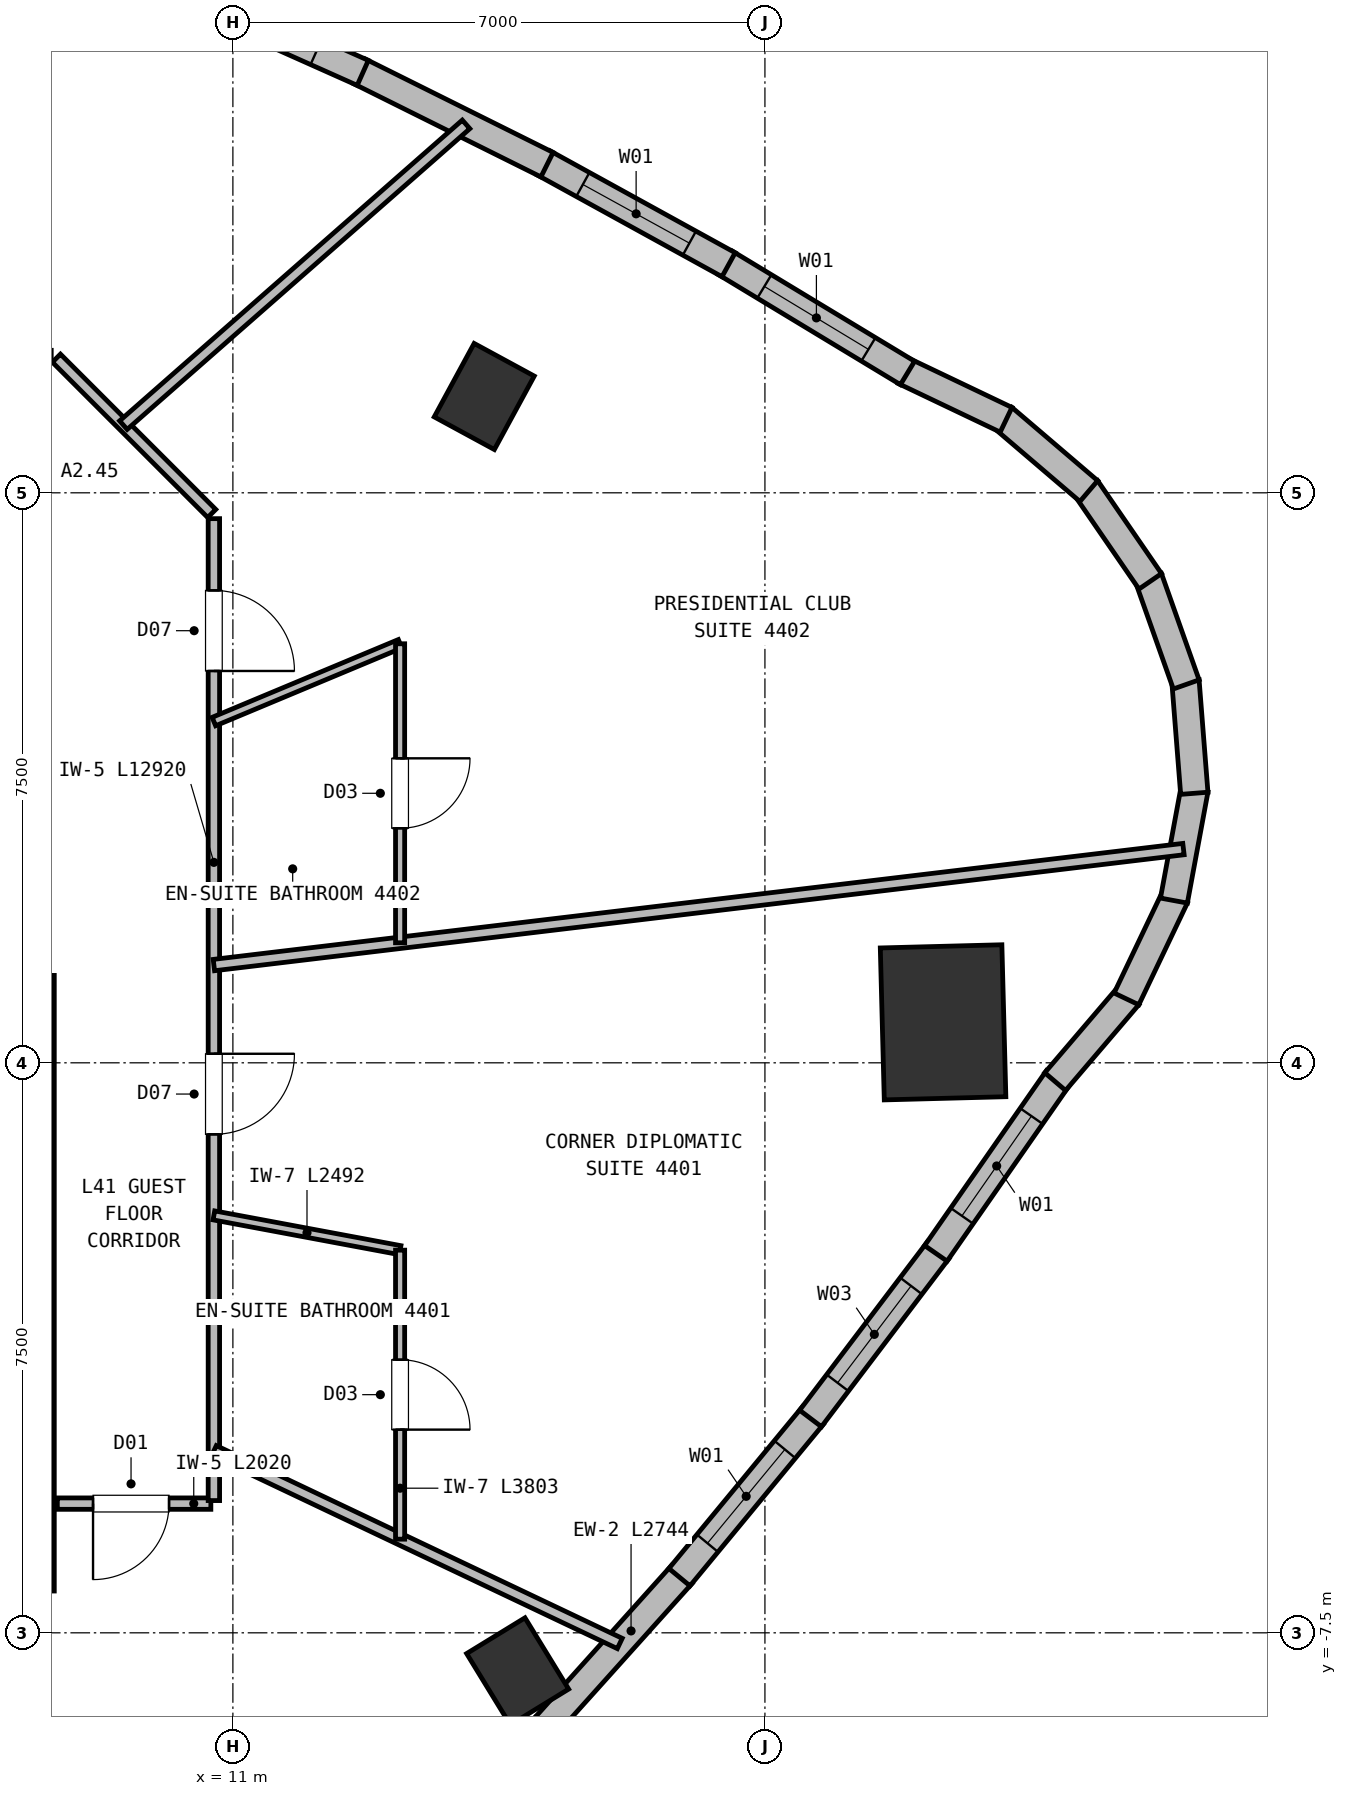
"""IFC4 building model, lengths in metres.
Left out: names, types, materials, properties, quantities, classifications, styles, units other than length and angle.
Written with IfcOpenShell. Run it as: python <this file> out.ifc"""

import sys

from ifc_helpers import new_model, si_unit, direction, frame, frame_2d, origin, origin_2d, place, context, subcontext, project, spatial, rectangle, extrude, element, fill, save


model = new_model("IFC4")
c1 = context("Model", 3, precision=1e-05, world=origin(), true_north=direction((0.0, 1.0)))
c2 = subcontext(c1, "Body", "Model", "MODEL_VIEW")
j1 = project(units=[si_unit("LENGTHUNIT", "METRE"), si_unit("PLANEANGLEUNIT", "RADIAN")], contexts=[c1])
p1 = place(None, origin())
s1 = spatial("IfcSite", under=j1, at=p1, CompositionType="ELEMENT")
p2 = place(p1, origin())
s2 = spatial("IfcBuilding", under=s1, at=p2, CompositionType="ELEMENT")
p3 = place(p2, frame((0.0, 0.0, 164.75)))
s3 = spatial("IfcBuildingStorey", under=s2, at=p3, CompositionType="ELEMENT", Elevation=164.75)
p4 = place(p3, frame((8.35, -6.95, 0.0), z_axis=(0.0, 0.0, 1.0), x_axis=(0.0, 1.0, 0.0)))
e1 = element("IfcWall", 1, at=p4, inside=s3, PredefinedType="SHEAR", context=c2, shape_type="SweptSolid", body=[
    extrude(rectangle(XDim=8.1, YDim=0.6, at=frame_2d((4.05, 0.0))), origin(), (0.0, 0.0, 1.0), 3.44),
])
p5 = place(p3, frame((14.747, -8.007, 0.0), z_axis=(0.0, 0.0, 1.0), x_axis=(0.852640164354, 0.522498564716, 0.0)))
e2 = element("IfcColumn", 2, at=p5, inside=s3, PredefinedType="COLUMN", context=c2, shape_type="SweptSolid", body=[
    extrude(rectangle(XDim=0.9, YDim=1.1, at=origin_2d()), origin(), (0.0, 0.0, 1.0), 3.75),
])
p6 = place(p3, frame((20.344, 0.533, 0.0), z_axis=(0.0, 0.0, 1.0), x_axis=(0.999657324976, 0.026176948308, 0.0)))
e3 = element("IfcColumn", 3, at=p6, inside=s3, PredefinedType="COLUMN", context=c2, shape_type="SweptSolid", body=[
    extrude(rectangle(XDim=1.6, YDim=2.0, at=origin_2d()), origin(), (0.0, 0.0, 1.0), 3.75),
])
p7 = place(p3, frame((14.307, 8.767, 0.0), z_axis=(0.0, 0.0, 1.0), x_axis=(-0.878817112662, 0.47715876026, 0.0)))
e4 = element("IfcColumn", 4, at=p7, inside=s3, PredefinedType="COLUMN", context=c2, shape_type="SweptSolid", body=[
    extrude(rectangle(XDim=0.9, YDim=1.1, at=origin_2d()), origin(), (0.0, 0.0, 1.0), 3.75),
])
p8 = place(p3, frame((16.908, -6.73, 0.0), z_axis=(0.0, 0.0, 1.0), x_axis=(-0.668236939939, -0.743948514415, 0.0)))
e5 = element("IfcWall", 5, at=p8, inside=s3, PredefinedType="SOLIDWALL", context=c2, shape_type="SweptSolid", body=[
    extrude(rectangle(XDim=2.744, YDim=0.36, at=frame_2d((1.372, 0.0))), origin(), (0.0, 0.0, 1.0), 3.44),
])
p9 = place(p3, frame((18.631, -4.641, 0.0), z_axis=(0.0, 0.0, 1.0), x_axis=(-0.636538297182, -0.771245094779, 0.0)))
e6 = element("IfcWall", 6, at=p9, inside=s3, PredefinedType="SOLIDWALL", context=c2, shape_type="SweptSolid", body=[
    extrude(rectangle(XDim=2.759, YDim=0.36, at=frame_2d((1.379, 0.0))), origin(), (0.0, 0.0, 1.0), 3.44),
])
p10 = place(p9, frame((0.579, 0.0, 0.72)))
e7 = element("IfcOpeningElement", 7, at=p10, cuts=e6, PredefinedType="OPENING", context=c2, shape_type="SweptSolid", body=[
    extrude(rectangle(XDim=1.6, YDim=1.88, at=frame_2d((0.8, 0.94))), frame((0.0, 0.19, 0.0), z_axis=(0.0, -1.0, 0.0), x_axis=(1.0, 0.0, 0.0)), (0.0, 0.0, 1.0), 0.38),
])
p11 = place(p3, frame((20.278, -2.467, 0.0), z_axis=(0.0, 0.0, 1.0), x_axis=(-0.604224865549, -0.796813850189, 0.0)))
e8 = element("IfcWall", 8, at=p11, inside=s3, PredefinedType="SOLIDWALL", context=c2, shape_type="SweptSolid", body=[
    extrude(rectangle(XDim=2.778, YDim=0.36, at=frame_2d((1.389, 0.0))), origin(), (0.0, 0.0, 1.0), 3.44),
])
p12 = place(p11, frame((0.589, 0.0, 0.72)))
e9 = element("IfcOpeningElement", 9, at=p12, cuts=e8, PredefinedType="OPENING", context=c2, shape_type="SweptSolid", body=[
    extrude(rectangle(XDim=1.6, YDim=1.88, at=frame_2d((0.8, 0.94))), frame((0.0, 0.19, 0.0), z_axis=(0.0, -1.0, 0.0), x_axis=(1.0, 0.0, 0.0)), (0.0, 0.0, 1.0), 0.38),
])
p13 = place(p3, frame((21.849, -0.208, 0.0), z_axis=(0.0, 0.0, 1.0), x_axis=(-0.571360652728, -0.820699094988, 0.0)))
e10 = element("IfcWall", 10, at=p13, inside=s3, PredefinedType="SOLIDWALL", context=c2, shape_type="SweptSolid", body=[
    extrude(rectangle(XDim=2.801, YDim=0.36, at=frame_2d((1.401, 0.0))), origin(), (0.0, 0.0, 1.0), 3.44),
])
p14 = place(p13, frame((0.601, 0.0, 0.72)))
e11 = element("IfcOpeningElement", 11, at=p14, cuts=e10, PredefinedType="OPENING", context=c2, shape_type="SweptSolid", body=[
    extrude(rectangle(XDim=1.6, YDim=1.88, at=frame_2d((0.8, 0.94))), frame((0.0, 0.19, 0.0), z_axis=(0.0, -1.0, 0.0), x_axis=(1.0, 0.0, 0.0)), (0.0, 0.0, 1.0), 0.38),
])
p15 = place(p3, frame((22.784, 0.882, 0.0), z_axis=(0.0, 0.0, 1.0), x_axis=(-0.649464075578, -0.760392276745, 0.0)))
e12 = element("IfcWall", 12, at=p15, inside=s3, PredefinedType="SOLIDWALL", context=c2, shape_type="SweptSolid", body=[
    extrude(rectangle(XDim=1.486, YDim=0.36, at=frame_2d((0.743, 0.0))), origin(), (0.0, 0.0, 1.0), 3.44),
])
for number, where, z_axis, x_axis in (
    (13, (23.396, 2.182, 0.0), (0.0, 0.0, 1.0), (-0.431, -0.903, 0.0)),
    (14, (23.652, 3.596, 0.0), (0.0, 0.0, 1.0), (-0.182, -0.983, 0.0)),
    (15, (23.533, 5.027, 0.0), (0.0, 0.0, 1.0), (0.078, -0.997, 0.0)),
    (16, (23.047, 6.379, 0.0), (0.0, 0.0, 1.0), (0.334, -0.943, 0.0)),
):
    element("IfcWall", number, at=place(p3, frame(where, z_axis=z_axis, x_axis=x_axis)), inside=s3, PredefinedType="SOLIDWALL", context=c2, shape_type="SweptSolid", body=[
        extrude(rectangle(XDim=1.486, YDim=0.36, at=frame_2d((0.743, 0.0))), origin(), (0.0, 0.0, 1.0), 3.44),
    ])
p16 = place(p3, frame((22.228, 7.56, 0.0), z_axis=(0.0, 0.0, 1.0), x_axis=(0.56647304132, -0.824080271247, 0.0)))
e17 = element("IfcWall", 17, at=p16, inside=s3, PredefinedType="SOLIDWALL", context=c2, shape_type="SweptSolid", body=[
    extrude(rectangle(XDim=1.486, YDim=0.36, at=frame_2d((0.743, 0.0))), origin(), (0.0, 0.0, 1.0), 3.44),
])
p17 = place(p3, frame((21.131, 8.488, 0.0), z_axis=(0.0, 0.0, 1.0), x_axis=(0.760392276745, -0.649464075578, 0.0)))
e18 = element("IfcWall", 18, at=p17, inside=s3, PredefinedType="SOLIDWALL", context=c2, shape_type="SweptSolid", body=[
    extrude(rectangle(XDim=1.486, YDim=0.36, at=frame_2d((0.743, 0.0))), origin(), (0.0, 0.0, 1.0), 3.44),
])
p18 = place(p3, frame((19.832, 9.101, 0.0), z_axis=(0.0, 0.0, 1.0), x_axis=(0.902523129088, -0.430641383823, 0.0)))
e19 = element("IfcWall", 19, at=p18, inside=s3, PredefinedType="SOLIDWALL", context=c2, shape_type="SweptSolid", body=[
    extrude(rectangle(XDim=1.486, YDim=0.36, at=frame_2d((0.743, 0.0))), origin(), (0.0, 0.0, 1.0), 3.44),
])
p19 = place(p3, frame((17.479, 10.526, 0.0), z_axis=(0.0, 0.0, 1.0), x_axis=(0.855749933122, -0.517389651967, 0.0)))
e20 = element("IfcWall", 20, at=p19, inside=s3, PredefinedType="SOLIDWALL", context=c2, shape_type="SweptSolid", body=[
    extrude(rectangle(XDim=2.801, YDim=0.36, at=frame_2d((1.4, 0.0))), origin(), (0.0, 0.0, 1.0), 3.44),
])
p20 = place(p19, frame((0.601, 0.0, 0.72)))
e21 = element("IfcOpeningElement", 21, at=p20, cuts=e20, PredefinedType="OPENING", context=c2, shape_type="SweptSolid", body=[
    extrude(rectangle(XDim=1.6, YDim=1.88, at=frame_2d((0.8, 0.94))), frame((0.0, 0.19, 0.0), z_axis=(0.0, -1.0, 0.0), x_axis=(1.0, 0.0, 0.0)), (0.0, 0.0, 1.0), 0.38),
])
p21 = place(p3, frame((15.089, 11.841, 0.0), z_axis=(0.0, 0.0, 1.0), x_axis=(0.876024703061, -0.482266233139, 0.0)))
e22 = element("IfcWall", 22, at=p21, inside=s3, PredefinedType="SOLIDWALL", context=c2, shape_type="SweptSolid", body=[
    extrude(rectangle(XDim=2.778, YDim=0.36, at=frame_2d((1.389, 0.0))), origin(), (0.0, 0.0, 1.0), 3.44),
])
p22 = place(p21, frame((0.589, 0.0, 0.72)))
e23 = element("IfcOpeningElement", 23, at=p22, cuts=e22, PredefinedType="OPENING", context=c2, shape_type="SweptSolid", body=[
    extrude(rectangle(XDim=1.6, YDim=1.88, at=frame_2d((0.8, 0.94))), frame((0.0, 0.19, 0.0), z_axis=(0.0, -1.0, 0.0), x_axis=(1.0, 0.0, 0.0)), (0.0, 0.0, 1.0), 0.38),
])
p23 = place(p3, frame((12.664, 13.047, 0.0), z_axis=(0.0, 0.0, 1.0), x_axis=(0.89522231214, -0.445619806389, 0.0)))
e24 = element("IfcWall", 24, at=p23, inside=s3, PredefinedType="SOLIDWALL", context=c2, shape_type="SweptSolid", body=[
    extrude(rectangle(XDim=2.759, YDim=0.36, at=frame_2d((1.379, 0.0))), origin(), (0.0, 0.0, 1.0), 3.44),
])
p24 = place(p3, frame((10.203, 14.144, 0.0), z_axis=(0.0, 0.0, 1.0), x_axis=(0.913079911719, -0.407780669987, 0.0)))
e25 = element("IfcWall", 25, at=p24, inside=s3, PredefinedType="SOLIDWALL", context=c2, shape_type="SweptSolid", body=[
    extrude(rectangle(XDim=2.744, YDim=0.36, at=frame_2d((1.372, 0.0))), origin(), (0.0, 0.0, 1.0), 3.44),
])
p25 = place(p24, frame((0.672, 0.0, 0.72)))
e26 = element("IfcOpeningElement", 26, at=p25, cuts=e25, PredefinedType="OPENING", context=c2, shape_type="SweptSolid", body=[
    extrude(rectangle(XDim=1.4, YDim=1.84, at=frame_2d((0.7, 0.92))), frame((0.0, 0.19, 0.0), z_axis=(0.0, -1.0, 0.0), x_axis=(1.0, 0.0, 0.0)), (0.0, 0.0, 1.0), 0.38),
])
p26 = place(p3, frame((10.71, -5.8, 0.0), z_axis=(0.0, 0.0, 1.0), x_axis=(-1.0, 0.0, 0.0)))
e27 = element("IfcWall", 27, at=p26, inside=s3, PredefinedType="PARTITIONING", context=c2, shape_type="SweptSolid", body=[
    extrude(rectangle(XDim=2.02, YDim=0.15, at=frame_2d((1.01, 0.0))), origin(), (0.0, 0.0, 1.0), 3.44),
])
p27 = place(p26, frame((0.55, 0.0, 0.0)))
e28 = element("IfcOpeningElement", 28, at=p27, cuts=e27, PredefinedType="OPENING", context=c2, shape_type="SweptSolid", body=[
    extrude(rectangle(XDim=1.0, YDim=2.15, at=frame_2d((0.5, 1.075))), frame((0.0, 0.085, 0.0), z_axis=(0.0, -1.0, 0.0), x_axis=(1.0, 0.0, 0.0)), (0.0, 0.0, 1.0), 0.17),
])
p28 = place(p3, frame((10.75, 7.16, 0.0), z_axis=(0.0, 0.0, 1.0), x_axis=(0.0, -1.0, 0.0)))
e29 = element("IfcWall", 29, at=p28, inside=s3, PredefinedType="PARTITIONING", context=c2, shape_type="SweptSolid", body=[
    extrude(rectangle(XDim=12.92, YDim=0.15, at=frame_2d((6.46, 0.0))), origin(), (0.0, 0.0, 1.0), 3.44),
])
p29 = place(p28, frame((7.041, 0.0, 0.0)))
e30 = element("IfcOpeningElement", 30, at=p29, cuts=e29, PredefinedType="OPENING", context=c2, shape_type="SweptSolid", body=[
    extrude(rectangle(XDim=1.06, YDim=2.15, at=frame_2d((0.53, 1.075))), frame((0.0, 0.085, 0.0), z_axis=(0.0, -1.0, 0.0), x_axis=(1.0, 0.0, 0.0)), (0.0, 0.0, 1.0), 0.17),
])
p30 = place(p28, frame((0.944, 0.0, 0.0)))
e31 = element("IfcOpeningElement", 31, at=p30, cuts=e29, PredefinedType="OPENING", context=c2, shape_type="SweptSolid", body=[
    extrude(rectangle(XDim=1.06, YDim=2.15, at=frame_2d((0.53, 1.075))), frame((0.0, 0.085, 0.0), z_axis=(0.0, -1.0, 0.0), x_axis=(1.0, 0.0, 0.0)), (0.0, 0.0, 1.0), 0.17),
])
p31 = place(p3, frame((8.678, 9.272, 0.0), z_axis=(0.0, 0.0, 1.0), x_axis=(0.707106781187, -0.707106781187, 0.0)))
e32 = element("IfcWall", 32, at=p31, inside=s3, PredefinedType="PARTITIONING", context=c2, shape_type="SweptSolid", body=[
    extrude(rectangle(XDim=2.89, YDim=0.15, at=frame_2d((1.445, 0.0))), origin(), (0.0, 0.0, 1.0), 3.44),
])
p32 = place(p3, frame((10.75, -5.104, 0.0), z_axis=(0.0, 0.0, 1.0), x_axis=(0.903343915081, -0.428916974583, 0.0)))
e33 = element("IfcWall", 33, at=p32, inside=s3, PredefinedType="PARTITIONING", context=c2, shape_type="SweptSolid", body=[
    extrude(rectangle(XDim=5.912, YDim=0.15, at=frame_2d((2.956, 0.0))), origin(), (0.0, 0.0, 1.0), 3.44),
])
p33 = place(p3, frame((10.75, -2.008, 0.0), z_axis=(0.0, 0.0, 1.0), x_axis=(0.983006110044, -0.183572840082, 0.0)))
e34 = element("IfcWall", 34, at=p33, inside=s3, PredefinedType="PARTITIONING", context=c2, shape_type="SweptSolid", body=[
    extrude(rectangle(XDim=2.492, YDim=0.12, at=frame_2d((1.246, 0.0))), origin(), (0.0, 0.0, 1.0), 3.44),
])
p34 = place(p3, frame((13.2, -2.465, 0.0), z_axis=(0.0, 0.0, 1.0), x_axis=(0.0, -1.0, 0.0)))
e35 = element("IfcWall", 35, at=p34, inside=s3, PredefinedType="PARTITIONING", context=c2, shape_type="SweptSolid", body=[
    extrude(rectangle(XDim=3.803, YDim=0.12, at=frame_2d((1.901, 0.0))), origin(), (0.0, 0.0, 1.0), 3.44),
])
p35 = place(p34, frame((1.441, 0.0, 0.0)))
e36 = element("IfcOpeningElement", 36, at=p35, cuts=e35, PredefinedType="OPENING", context=c2, shape_type="SweptSolid", body=[
    extrude(rectangle(XDim=0.92, YDim=2.1, at=frame_2d((0.46, 1.05))), frame((0.0, 0.07, 0.0), z_axis=(0.0, -1.0, 0.0), x_axis=(1.0, 0.0, 0.0)), (0.0, 0.0, 1.0), 0.14),
])
p36 = place(p3, frame((10.75, 1.286, 0.0), z_axis=(0.0, 0.0, 1.0), x_axis=(0.99291975517, 0.118787035455, 0.0)))
e37 = element("IfcWall", 37, at=p36, inside=s3, PredefinedType="PARTITIONING", context=c2, shape_type="SweptSolid", body=[
    extrude(rectangle(XDim=12.848, YDim=0.15, at=frame_2d((6.424, 0.0))), origin(), (0.0, 0.0, 1.0), 3.44),
])
p37 = place(p3, frame((13.2, 5.514, 0.0), z_axis=(0.0, 0.0, 1.0), x_axis=(-0.922725602601, -0.38545747146, 0.0)))
e38 = element("IfcWall", 38, at=p37, inside=s3, PredefinedType="PARTITIONING", context=c2, shape_type="SweptSolid", body=[
    extrude(rectangle(XDim=2.655, YDim=0.12, at=frame_2d((1.328, 0.0))), origin(), (0.0, 0.0, 1.0), 3.44),
])
p38 = place(p3, frame((13.2, 5.514, 0.0), z_axis=(0.0, 0.0, 1.0), x_axis=(0.0, -1.0, 0.0)))
e39 = element("IfcWall", 39, at=p38, inside=s3, PredefinedType="PARTITIONING", context=c2, shape_type="SweptSolid", body=[
    extrude(rectangle(XDim=3.935, YDim=0.12, at=frame_2d((1.967, 0.0))), origin(), (0.0, 0.0, 1.0), 3.44),
])
p39 = place(p38, frame((1.507, 0.0, 0.0)))
e40 = element("IfcOpeningElement", 40, at=p39, cuts=e39, PredefinedType="OPENING", context=c2, shape_type="SweptSolid", body=[
    extrude(rectangle(XDim=0.92, YDim=2.1, at=frame_2d((0.46, 1.05))), frame((0.0, 0.07, 0.0), z_axis=(0.0, -1.0, 0.0), x_axis=(1.0, 0.0, 0.0)), (0.0, 0.0, 1.0), 0.14),
])
p40 = place(p3, frame((9.56, 8.39, 0.0), z_axis=(0.0, 0.0, 1.0), x_axis=(0.751542092704, 0.659685139209, 0.0)))
e41 = element("IfcWall", 41, at=p40, inside=s3, PredefinedType="PARTITIONING", context=c2, shape_type="SweptSolid", body=[
    extrude(rectangle(XDim=5.999, YDim=0.15, at=frame_2d((3.0, 0.0))), origin(), (0.0, 0.0, 1.0), 3.44),
])
p41 = place(p10, origin())
e42 = element("IfcWindow", 42, at=p41, inside=s3, PartitioningType="SINGLE_PANEL", PredefinedType="WINDOW", context=c2, shape_type="SweptSolid", body=[
    extrude(rectangle(XDim=1.6, YDim=1.88, at=frame_2d((0.8, 0.94))), frame((0.0, 0.03, 0.0), z_axis=(0.0, -1.0, 0.0), x_axis=(1.0, 0.0, 0.0)), (0.0, 0.0, 1.0), 0.06),
])
fill(e7, e42)
p42 = place(p12, origin())
e43 = element("IfcWindow", 43, at=p42, inside=s3, PartitioningType="SINGLE_PANEL", PredefinedType="WINDOW", context=c2, shape_type="SweptSolid", body=[
    extrude(rectangle(XDim=1.6, YDim=1.88, at=frame_2d((0.8, 0.94))), frame((0.0, 0.03, 0.0), z_axis=(0.0, -1.0, 0.0), x_axis=(1.0, 0.0, 0.0)), (0.0, 0.0, 1.0), 0.06),
])
fill(e9, e43)
p43 = place(p14, origin())
e44 = element("IfcWindow", 44, at=p43, inside=s3, PartitioningType="SINGLE_PANEL", PredefinedType="WINDOW", context=c2, shape_type="SweptSolid", body=[
    extrude(rectangle(XDim=1.6, YDim=1.88, at=frame_2d((0.8, 0.94))), frame((0.0, 0.03, 0.0), z_axis=(0.0, -1.0, 0.0), x_axis=(1.0, 0.0, 0.0)), (0.0, 0.0, 1.0), 0.06),
])
fill(e11, e44)
p44 = place(p20, origin())
e45 = element("IfcWindow", 45, at=p44, inside=s3, PartitioningType="SINGLE_PANEL", PredefinedType="WINDOW", context=c2, shape_type="SweptSolid", body=[
    extrude(rectangle(XDim=1.6, YDim=1.88, at=frame_2d((0.8, 0.94))), frame((0.0, 0.03, 0.0), z_axis=(0.0, -1.0, 0.0), x_axis=(1.0, 0.0, 0.0)), (0.0, 0.0, 1.0), 0.06),
])
fill(e21, e45)
p45 = place(p22, origin())
e46 = element("IfcWindow", 46, at=p45, inside=s3, PartitioningType="SINGLE_PANEL", PredefinedType="WINDOW", context=c2, shape_type="SweptSolid", body=[
    extrude(rectangle(XDim=1.6, YDim=1.88, at=frame_2d((0.8, 0.94))), frame((0.0, 0.03, 0.0), z_axis=(0.0, -1.0, 0.0), x_axis=(1.0, 0.0, 0.0)), (0.0, 0.0, 1.0), 0.06),
])
fill(e23, e46)
p46 = place(p25, origin())
e47 = element("IfcWindow", 47, at=p46, inside=s3, PartitioningType="SINGLE_PANEL", PredefinedType="WINDOW", context=c2, shape_type="SweptSolid", body=[
    extrude(rectangle(XDim=1.4, YDim=1.84, at=frame_2d((0.7, 0.92))), frame((0.0, 0.03, 0.0), z_axis=(0.0, -1.0, 0.0), x_axis=(1.0, 0.0, 0.0)), (0.0, 0.0, 1.0), 0.06),
])
fill(e26, e47)
p47 = place(p35, origin())
e48 = element("IfcDoor", 48, at=p47, inside=s3, OperationType="SINGLE_SWING_RIGHT", PredefinedType="DOOR", context=c2, shape_type="SweptSolid", body=[
    extrude(rectangle(XDim=0.92, YDim=2.1, at=frame_2d((0.46, 1.05))), frame((0.0, 0.025, 0.0), z_axis=(0.0, -1.0, 0.0), x_axis=(1.0, 0.0, 0.0)), (0.0, 0.0, 1.0), 0.05),
])
fill(e36, e48)
p48 = place(p39, origin())
e49 = element("IfcDoor", 49, at=p48, inside=s3, OperationType="SINGLE_SWING_LEFT", PredefinedType="DOOR", context=c2, shape_type="SweptSolid", body=[
    extrude(rectangle(XDim=0.92, YDim=2.1, at=frame_2d((0.46, 1.05))), frame((0.0, 0.025, 0.0), z_axis=(0.0, -1.0, 0.0), x_axis=(1.0, 0.0, 0.0)), (0.0, 0.0, 1.0), 0.05),
])
fill(e40, e49)
p49 = place(p29, origin())
e50 = element("IfcDoor", 50, at=p49, inside=s3, OperationType="SINGLE_SWING_LEFT", PredefinedType="DOOR", context=c2, shape_type="SweptSolid", body=[
    extrude(rectangle(XDim=1.06, YDim=2.15, at=frame_2d((0.53, 1.075))), frame((0.0, 0.025, 0.0), z_axis=(0.0, -1.0, 0.0), x_axis=(1.0, 0.0, 0.0)), (0.0, 0.0, 1.0), 0.05),
])
fill(e30, e50)
p50 = place(p30, origin())
e51 = element("IfcDoor", 51, at=p50, inside=s3, OperationType="SINGLE_SWING_RIGHT", PredefinedType="DOOR", context=c2, shape_type="SweptSolid", body=[
    extrude(rectangle(XDim=1.06, YDim=2.15, at=frame_2d((0.53, 1.075))), frame((0.0, 0.025, 0.0), z_axis=(0.0, -1.0, 0.0), x_axis=(1.0, 0.0, 0.0)), (0.0, 0.0, 1.0), 0.05),
])
fill(e31, e51)
p51 = place(p27, origin())
e52 = element("IfcDoor", 52, at=p51, inside=s3, OperationType="SINGLE_SWING_RIGHT", PredefinedType="DOOR", context=c2, shape_type="SweptSolid", body=[
    extrude(rectangle(XDim=1.0, YDim=2.15, at=frame_2d((0.5, 1.075))), frame((0.0, 0.025, 0.0), z_axis=(0.0, -1.0, 0.0), x_axis=(1.0, 0.0, 0.0)), (0.0, 0.0, 1.0), 0.05),
])
fill(e28, e52)
save(model, sys.argv[1])
